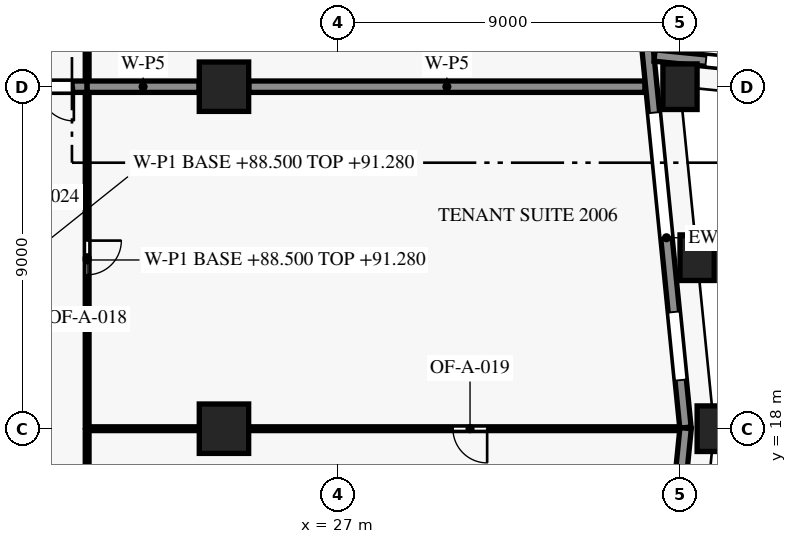
"""IFC4 building model, lengths in metres.
Left out: names, types, materials, properties, quantities, classifications, styles, units other than length and angle.
Written with IfcOpenShell. Run it as: python <this file> out.ifc"""

import sys

from ifc_helpers import new_model, si_unit, direction, frame, frame_2d, origin, origin_2d, place, context, subcontext, project, spatial, rectangle, extrude, element, fill, save


model = new_model("IFC4")
c1 = context("Model", 3, precision=1e-05, world=origin(), true_north=direction((0.0, 1.0)))
c2 = subcontext(c1, "Body", "Model", "MODEL_VIEW")
j1 = project(units=[si_unit("LENGTHUNIT", "METRE"), si_unit("PLANEANGLEUNIT", "RADIAN")], contexts=[c1])
p1 = place(None, origin())
s1 = spatial("IfcSite", under=j1, at=p1, CompositionType="ELEMENT")
p2 = place(p1, origin())
s2 = spatial("IfcBuilding", under=s1, at=p2, CompositionType="ELEMENT")
p3 = place(p2, frame((0.0, 0.0, 88.5)))
s3 = spatial("IfcBuildingStorey", under=s2, at=p3, CompositionType="ELEMENT", Elevation=88.5)
for number, where, z_axis, x_axis in (
    (1, (36.9, 18.0, 0.0), (0.0, 0.0, 1.0), (0.0, 1.0, 0.0)),
    (2, (36.45, 22.5, 0.0), (0.0, 0.0, 1.0), (-0.1, 0.995, 0.0)),
    (3, (36.0, 27.0, 0.0), (0.0, 0.0, 1.0), (-0.1, 0.995, 0.0)),
):
    element("IfcColumn", number, at=place(p3, frame(where, z_axis=z_axis, x_axis=x_axis)), inside=s3, PredefinedType="COLUMN", context=c2, shape_type="SweptSolid", body=[
        extrude(rectangle(XDim=0.9, YDim=1.2, at=origin_2d()), origin(), (0.0, 0.0, 1.0), 3.8),
    ])
for number, where, z_axis, x_axis in (
    (4, (24.0, 18.0, 0.0), (0.0, 0.0, 1.0), (1.0, 0.0, 0.0)),
    (5, (24.0, 27.0, 0.0), (0.0, 0.0, 1.0), (1.0, 0.0, 0.0)),
):
    element("IfcColumn", number, at=place(p3, frame(where, z_axis=z_axis, x_axis=x_axis)), inside=s3, PredefinedType="COLUMN", context=c2, shape_type="SweptSolid", body=[
        extrude(rectangle(XDim=1.3, YDim=1.3, at=origin_2d()), origin(), (0.0, 0.0, 1.0), 3.8),
    ])
p4 = place(p3, frame((36.148, 18.015, 0.0), z_axis=(0.0, 0.0, 1.0), x_axis=(-0.099495688264, -0.995037993253, 0.0)))
e6 = element("IfcWall", 6, at=p4, inside=s3, PredefinedType="SOLIDWALL", context=c2, shape_type="SweptSolid", body=[
    extrude(rectangle(XDim=9.03, YDim=0.3, at=frame_2d((4.515, 0.0))), origin(), (0.0, 0.0, 1.0), 3.15),
])
p5 = place(p4, frame((1.301, 0.0, 0.75)))
e7 = element("IfcOpeningElement", 7, at=p5, cuts=e6, PredefinedType="OPENING", context=c2, shape_type="SweptSolid", body=[
    extrude(rectangle(XDim=1.8, YDim=1.8, at=frame_2d((0.9, 0.9))), frame((0.0, 0.16, 0.0), z_axis=(0.0, -1.0, 0.0), x_axis=(1.0, 0.0, 0.0)), (0.0, 0.0, 1.0), 0.32),
])
p6 = place(p4, frame((5.073, 0.0, 0.15)))
e8 = element("IfcOpeningElement", 8, at=p6, cuts=e6, PredefinedType="OPENING", context=c2, shape_type="SweptSolid", body=[
    extrude(rectangle(XDim=3.3, YDim=2.4, at=frame_2d((1.65, 1.2))), frame((0.0, 0.16, 0.0), z_axis=(0.0, -1.0, 0.0), x_axis=(1.0, 0.0, 0.0)), (0.0, 0.0, 1.0), 0.32),
])
p7 = place(p3, frame((35.144, 28.02, 0.0), z_axis=(0.0, 0.0, 1.0), x_axis=(0.099503719021, -0.99503719021, 0.0)))
e9 = element("IfcWall", 9, at=p7, inside=s3, PredefinedType="SOLIDWALL", context=c2, shape_type="SweptSolid", body=[
    extrude(rectangle(XDim=10.04, YDim=0.3, at=frame_2d((5.02, 0.0))), origin(), (0.0, 0.0, 1.0), 3.15),
])
p8 = place(p7, frame((1.711, 0.0, 0.15)))
e10 = element("IfcOpeningElement", 10, at=p8, cuts=e9, PredefinedType="OPENING", context=c2, shape_type="SweptSolid", body=[
    extrude(rectangle(XDim=3.3, YDim=2.4, at=frame_2d((1.65, 1.2))), frame((0.0, 0.16, 0.0), z_axis=(0.0, -1.0, 0.0), x_axis=(1.0, 0.0, 0.0)), (0.0, 0.0, 1.0), 0.32),
])
p9 = place(p7, frame((6.984, 0.0, 0.75)))
e11 = element("IfcOpeningElement", 11, at=p9, cuts=e9, PredefinedType="OPENING", context=c2, shape_type="SweptSolid", body=[
    extrude(rectangle(XDim=1.8, YDim=1.8, at=frame_2d((0.9, 0.9))), frame((0.0, 0.16, 0.0), z_axis=(0.0, -1.0, 0.0), x_axis=(1.0, 0.0, 0.0)), (0.0, 0.0, 1.0), 0.32),
])
p10 = place(p3, frame((45.015, 26.852, 0.0), z_axis=(0.0, 0.0, 1.0), x_axis=(-0.995037438546, 0.099501235631, 0.0)))
e12 = element("IfcWall", 12, at=p10, inside=s3, PredefinedType="SOLIDWALL", context=c2, shape_type="SweptSolid", body=[
    extrude(rectangle(XDim=9.734, YDim=0.3, at=frame_2d((4.867, 0.0))), origin(), (0.0, 0.0, 1.0), 3.15),
])
p11 = place(p10, frame((1.301, 0.0, 0.75)))
e13 = element("IfcOpeningElement", 13, at=p11, cuts=e12, PredefinedType="OPENING", context=c2, shape_type="SweptSolid", body=[
    extrude(rectangle(XDim=1.8, YDim=1.8, at=frame_2d((0.9, 0.9))), frame((0.0, 0.16, 0.0), z_axis=(0.0, -1.0, 0.0), x_axis=(1.0, 0.0, 0.0)), (0.0, 0.0, 1.0), 0.32),
])
p12 = place(p10, frame((5.073, 0.0, 0.15)))
e14 = element("IfcOpeningElement", 14, at=p12, cuts=e12, PredefinedType="OPENING", context=c2, shape_type="SweptSolid", body=[
    extrude(rectangle(XDim=3.3, YDim=2.4, at=frame_2d((1.65, 1.2))), frame((0.0, 0.16, 0.0), z_axis=(0.0, -1.0, 0.0), x_axis=(1.0, 0.0, 0.0)), (0.0, 0.0, 1.0), 0.32),
])
p13 = place(p3, frame((20.4, 17.95, 0.0), z_axis=(0.0, 0.0, 1.0), x_axis=(0.0, -1.0, 0.0)))
e15 = element("IfcWall", 15, at=p13, inside=s3, PredefinedType="PARTITIONING", context=c2, shape_type="SweptSolid", body=[
    extrude(rectangle(XDim=4.4, YDim=0.1, at=frame_2d((2.2, 0.0))), origin(), (0.0, 0.0, 1.0), 2.88),
])
p14 = place(p3, frame((23.345, 18.0, 0.0), z_axis=(0.0, 0.0, 1.0), x_axis=(-1.0, 0.0, 0.0)))
e16 = element("IfcWall", 16, at=p14, inside=s3, PredefinedType="PARTITIONING", context=c2, shape_type="SweptSolid", body=[
    extrude(rectangle(XDim=2.895, YDim=0.1, at=frame_2d((1.448, 0.0))), origin(), (0.0, 0.0, 1.0), 2.88),
])
p15 = place(p3, frame((35.976, 18.0, 0.0), z_axis=(0.0, 0.0, 1.0), x_axis=(-1.0, 0.0, 0.0)))
e17 = element("IfcWall", 17, at=p15, inside=s3, PredefinedType="PARTITIONING", context=c2, shape_type="SweptSolid", body=[
    extrude(rectangle(XDim=11.321, YDim=0.1, at=frame_2d((5.66, 0.0))), origin(), (0.0, 0.0, 1.0), 2.88),
])
p16 = place(p15, frame((5.051, 0.0, 0.0)))
e18 = element("IfcOpeningElement", 18, at=p16, cuts=e17, PredefinedType="OPENING", context=c2, shape_type="SweptSolid", body=[
    extrude(rectangle(XDim=0.9, YDim=2.1, at=frame_2d((0.45, 1.05))), frame((0.0, 0.06, 0.0), z_axis=(0.0, -1.0, 0.0), x_axis=(1.0, 0.0, 0.0)), (0.0, 0.0, 1.0), 0.12),
])
p17 = place(p3, frame((20.4, 26.83, 0.0), z_axis=(0.0, 0.0, 1.0), x_axis=(0.0, -1.0, 0.0)))
e19 = element("IfcWall", 19, at=p17, inside=s3, PredefinedType="PARTITIONING", context=c2, shape_type="SweptSolid", body=[
    extrude(rectangle(XDim=8.78, YDim=0.1, at=frame_2d((4.39, 0.0))), origin(), (0.0, 0.0, 1.0), 2.78),
])
p18 = place(p17, frame((3.88, 0.0, 0.0)))
e20 = element("IfcOpeningElement", 20, at=p18, cuts=e19, PredefinedType="OPENING", context=c2, shape_type="SweptSolid", body=[
    extrude(rectangle(XDim=0.9, YDim=2.1, at=frame_2d((0.45, 1.05))), frame((0.0, 0.06, 0.0), z_axis=(0.0, -1.0, 0.0), x_axis=(1.0, 0.0, 0.0)), (0.0, 0.0, 1.0), 0.12),
])
p19 = place(p3, frame((20.4, 27.0, 0.0), z_axis=(0.0, 0.0, 1.0), x_axis=(-1.0, 0.0, 0.0)))
e21 = element("IfcWall", 21, at=p19, inside=s3, PredefinedType="PARTITIONING", context=c2, shape_type="SweptSolid", body=[
    extrude(rectangle(XDim=2.5, YDim=0.3, at=frame_2d((1.25, 0.0))), origin(), (0.0, 0.0, 1.0), 2.78),
])
p20 = place(p19, frame((0.35, 0.0, 0.0)))
e22 = element("IfcOpeningElement", 22, at=p20, cuts=e21, PredefinedType="OPENING", context=c2, shape_type="SweptSolid", body=[
    extrude(rectangle(XDim=1.8, YDim=2.1, at=frame_2d((0.9, 1.05))), frame((0.0, 0.16, 0.0), z_axis=(0.0, -1.0, 0.0), x_axis=(1.0, 0.0, 0.0)), (0.0, 0.0, 1.0), 0.32),
])
p21 = place(p3, frame((20.4, 27.0, 0.0), z_axis=(0.0, 0.0, 1.0), x_axis=(1.0, 0.0, 0.0)))
e23 = element("IfcWall", 23, at=p21, inside=s3, PredefinedType="PARTITIONING", context=c2, shape_type="SweptSolid", body=[
    extrude(rectangle(XDim=2.945, YDim=0.3, at=frame_2d((1.473, 0.0))), origin(), (0.0, 0.0, 1.0), 2.78),
])
for number, where, z_axis, x_axis in (
    (24, (24.655, 27.0, 0.0), (0.0, 0.0, 1.0), (1.0, 0.0, 0.0)),
    (25, (36.0, 27.925, 0.0), (0.0, 0.0, 1.0), (0.0, 1.0, 0.0)),
):
    element("IfcWall", number, at=place(p3, frame(where, z_axis=z_axis, x_axis=x_axis)), inside=s3, PredefinedType="PARTITIONING", context=c2, shape_type="SweptSolid", body=[
        extrude(rectangle(XDim=10.42, YDim=0.3, at=frame_2d((5.21, 0.0))), origin(), (0.0, 0.0, 1.0), 2.78),
    ])
p22 = place(p3, frame((20.4, 33.45, 0.0), z_axis=(0.0, 0.0, 1.0), x_axis=(0.0, -1.0, 0.0)))
e26 = element("IfcWall", 26, at=p22, inside=s3, PredefinedType="PARTITIONING", context=c2, shape_type="SweptSolid", body=[
    extrude(rectangle(XDim=6.28, YDim=0.1, at=frame_2d((3.14, 0.0))), origin(), (0.0, 0.0, 1.0), 2.78),
])
p23 = place(p8, origin())
e27 = element("IfcWindow", 27, at=p23, inside=s3, PartitioningType="SINGLE_PANEL", PredefinedType="WINDOW", context=c2, shape_type="SweptSolid", body=[
    extrude(rectangle(XDim=3.3, YDim=2.4, at=frame_2d((1.65, 1.2))), frame((0.0, 0.03, 0.0), z_axis=(0.0, -1.0, 0.0), x_axis=(1.0, 0.0, 0.0)), (0.0, 0.0, 1.0), 0.06),
])
fill(e10, e27)
p24 = place(p9, origin())
e28 = element("IfcWindow", 28, at=p24, inside=s3, PartitioningType="SINGLE_PANEL", PredefinedType="WINDOW", context=c2, shape_type="SweptSolid", body=[
    extrude(rectangle(XDim=1.8, YDim=1.8, at=frame_2d((0.9, 0.9))), frame((0.0, 0.03, 0.0), z_axis=(0.0, -1.0, 0.0), x_axis=(1.0, 0.0, 0.0)), (0.0, 0.0, 1.0), 0.06),
])
fill(e11, e28)
p25 = place(p12, origin())
e29 = element("IfcWindow", 29, at=p25, inside=s3, PartitioningType="SINGLE_PANEL", PredefinedType="WINDOW", context=c2, shape_type="SweptSolid", body=[
    extrude(rectangle(XDim=3.3, YDim=2.4, at=frame_2d((1.65, 1.2))), frame((0.0, 0.03, 0.0), z_axis=(0.0, -1.0, 0.0), x_axis=(1.0, 0.0, 0.0)), (0.0, 0.0, 1.0), 0.06),
])
fill(e14, e29)
p26 = place(p18, origin())
e30 = element("IfcDoor", 30, at=p26, inside=s3, OperationType="SINGLE_SWING_LEFT", PredefinedType="DOOR", context=c2, shape_type="SweptSolid", body=[
    extrude(rectangle(XDim=0.9, YDim=2.1, at=frame_2d((0.45, 1.05))), frame((0.0, 0.025, 0.0), z_axis=(0.0, -1.0, 0.0), x_axis=(1.0, 0.0, 0.0)), (0.0, 0.0, 1.0), 0.05),
])
fill(e20, e30)
p27 = place(p16, origin())
e31 = element("IfcDoor", 31, at=p27, inside=s3, OperationType="SINGLE_SWING_LEFT", PredefinedType="DOOR", context=c2, shape_type="SweptSolid", body=[
    extrude(rectangle(XDim=0.9, YDim=2.1, at=frame_2d((0.45, 1.05))), frame((0.0, 0.025, 0.0), z_axis=(0.0, -1.0, 0.0), x_axis=(1.0, 0.0, 0.0)), (0.0, 0.0, 1.0), 0.05),
])
fill(e18, e31)
p28 = place(p20, origin())
e32 = element("IfcDoor", 32, at=p28, inside=s3, OperationType="DOUBLE_DOOR_SINGLE_SWING", PredefinedType="DOOR", context=c2, shape_type="SweptSolid", body=[
    extrude(rectangle(XDim=1.8, YDim=2.1, at=frame_2d((0.9, 1.05))), frame((0.0, 0.025, 0.0), z_axis=(0.0, -1.0, 0.0), x_axis=(1.0, 0.0, 0.0)), (0.0, 0.0, 1.0), 0.05),
])
fill(e22, e32)
save(model, sys.argv[1])
